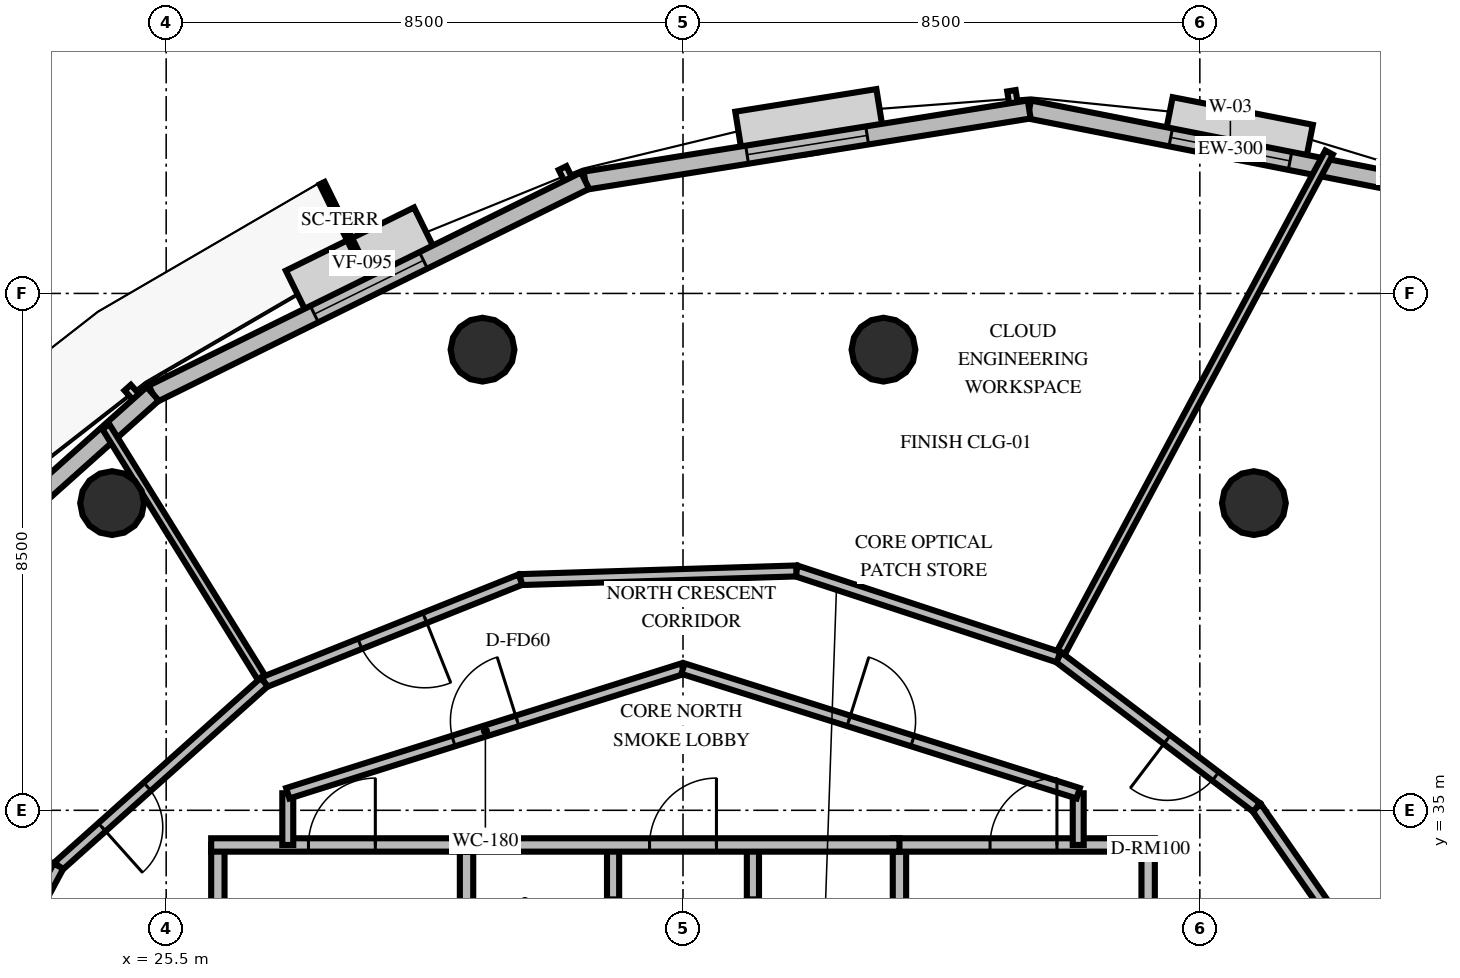
"""IFC4 building model, lengths in metres.
Left out: names, types, materials, properties, quantities, classifications, styles, units other than length and angle.
Written with IfcOpenShell. Run it as: python <this file> out.ifc"""

import sys

from ifc_helpers import new_model, si_unit, direction, frame, frame_2d, origin, origin_2d, place, context, subcontext, project, spatial, rectangle, circle, extrude, element, fill, save


model = new_model("IFC4")
c1 = context("Model", 3, precision=1e-05, world=origin(), true_north=direction((0.0, 1.0)))
c2 = subcontext(c1, "Body", "Model", "MODEL_VIEW")
j1 = project(units=[si_unit("LENGTHUNIT", "METRE"), si_unit("PLANEANGLEUNIT", "RADIAN")], contexts=[c1])
p1 = place(None, origin())
s1 = spatial("IfcSite", under=j1, at=p1, CompositionType="ELEMENT")
p2 = place(p1, origin())
s2 = spatial("IfcBuilding", under=s1, at=p2, CompositionType="ELEMENT")
p3 = place(p2, frame((0.0, 0.0, 206.0)))
s3 = spatial("IfcBuildingStorey", under=s2, at=p3, CompositionType="ELEMENT", Elevation=206.0)
for number, where, z_axis, x_axis in (
    (1, (43.389, 40.052, 0.0), (0.0, 0.0, 1.0), (1.0, 0.0, 0.0)),
    (2, (37.297, 42.575, 0.0), (0.0, 0.0, 1.0), (1.0, 0.0, 0.0)),
    (3, (30.703, 42.575, 0.0), (0.0, 0.0, 1.0), (1.0, 0.0, 0.0)),
    (4, (24.611, 40.052, 0.0), (0.0, 0.0, 1.0), (1.0, 0.0, 0.0)),
):
    element("IfcColumn", number, at=place(p3, frame(where, z_axis=z_axis, x_axis=x_axis)), inside=s3, PredefinedType="COLUMN", context=c2, shape_type="SweptSolid", body=[
        extrude(circle(Radius=0.525, at=origin_2d()), origin(), (0.0, 0.0, 1.0), 3.6),
    ])
p4 = place(p3, frame((46.312, 45.22, 0.0), z_axis=(0.0, 0.0, 1.0), x_axis=(-0.981100617883, 0.193498262496, 0.0)))
e5 = element("IfcWall", 5, at=p4, inside=s3, PredefinedType="SOLIDWALL", context=c2, shape_type="SweptSolid", body=[
    extrude(rectangle(XDim=6.745, YDim=0.3, at=frame_2d((3.373, 0.0))), origin(), (0.0, 0.0, 1.0), 2.66),
])
p5 = place(p4, frame((2.373, 0.0, 0.8)))
e6 = element("IfcOpeningElement", 6, at=p5, cuts=e5, PredefinedType="OPENING", context=c2, shape_type="SweptSolid", body=[
    extrude(rectangle(XDim=2.0, YDim=1.85, at=frame_2d((1.0, 0.925))), frame((0.0, 0.16, 0.0), z_axis=(0.0, -1.0, 0.0), x_axis=(1.0, 0.0, 0.0)), (0.0, 0.0, 1.0), 0.32),
])
p6 = place(p3, frame((39.694, 46.525, 0.0), z_axis=(0.0, 0.0, 1.0), x_axis=(-0.987398789475, -0.158251794757, 0.0)))
e7 = element("IfcWall", 7, at=p6, inside=s3, PredefinedType="SOLIDWALL", context=c2, shape_type="SweptSolid", body=[
    extrude(rectangle(XDim=7.397, YDim=0.3, at=frame_2d((3.699, 0.0))), origin(), (0.0, 0.0, 1.0), 2.66),
])
p7 = place(p6, frame((2.699, 0.0, 0.8)))
e8 = element("IfcOpeningElement", 8, at=p7, cuts=e7, PredefinedType="OPENING", context=c2, shape_type="SweptSolid", body=[
    extrude(rectangle(XDim=2.0, YDim=1.85, at=frame_2d((1.0, 0.925))), frame((0.0, 0.16, 0.0), z_axis=(0.0, -1.0, 0.0), x_axis=(1.0, 0.0, 0.0)), (0.0, 0.0, 1.0), 0.32),
])
p8 = place(p3, frame((32.39, 45.355, 0.0), z_axis=(0.0, 0.0, 1.0), x_axis=(-0.896932281423, -0.442167934773, 0.0)))
e9 = element("IfcWall", 9, at=p8, inside=s3, PredefinedType="SOLIDWALL", context=c2, shape_type="SweptSolid", body=[
    extrude(rectangle(XDim=7.927, YDim=0.3, at=frame_2d((3.964, 0.0))), origin(), (0.0, 0.0, 1.0), 2.66),
])
p9 = place(p8, frame((2.964, 0.0, 0.8)))
e10 = element("IfcOpeningElement", 10, at=p9, cuts=e9, PredefinedType="OPENING", context=c2, shape_type="SweptSolid", body=[
    extrude(rectangle(XDim=2.0, YDim=1.85, at=frame_2d((1.0, 0.925))), frame((0.0, 0.16, 0.0), z_axis=(0.0, -1.0, 0.0), x_axis=(1.0, 0.0, 0.0)), (0.0, 0.0, 1.0), 0.32),
])
p10 = place(p3, frame((25.28, 41.85, 0.0), z_axis=(0.0, 0.0, 1.0), x_axis=(-0.745478547566, -0.666529620586, 0.0)))
e11 = element("IfcWall", 11, at=p10, inside=s3, PredefinedType="SOLIDWALL", context=c2, shape_type="SweptSolid", body=[
    extrude(rectangle(XDim=8.127, YDim=0.3, at=frame_2d((4.063, 0.0))), origin(), (0.0, 0.0, 1.0), 2.66),
])
p11 = place(p10, frame((4.51, 0.0, 0.0)))
e12 = element("IfcOpeningElement", 12, at=p11, cuts=e11, PredefinedType="OPENING", context=c2, shape_type="SweptSolid", body=[
    extrude(rectangle(XDim=1.05, YDim=2.15, at=frame_2d((0.525, 1.075))), frame((0.0, 0.16, 0.0), z_axis=(0.0, -1.0, 0.0), x_axis=(1.0, 0.0, 0.0)), (0.0, 0.0, 1.0), 0.32),
])
p12 = place(p3, frame((26.35, 30.05, 0.0), z_axis=(0.0, 0.0, 1.0), x_axis=(0.0, 1.0, 0.0)))
e13 = element("IfcWall", 13, at=p12, inside=s3, PredefinedType="SOLIDWALL", context=c2, shape_type="SweptSolid", body=[
    extrude(rectangle(XDim=4.38, YDim=0.22, at=frame_2d((2.19, 0.0))), origin(), (0.0, 0.0, 1.0), 2.46),
])
p13 = place(p3, frame((30.44, 30.05, 0.0), z_axis=(0.0, 0.0, 1.0), x_axis=(0.0, 1.0, 0.0)))
e14 = element("IfcWall", 14, at=p13, inside=s3, PredefinedType="SOLIDWALL", context=c2, shape_type="SweptSolid", body=[
    extrude(rectangle(XDim=4.38, YDim=0.22, at=frame_2d((2.19, 0.0))), origin(), (0.0, 0.0, 1.0), 2.46),
])
p14 = place(p13, frame((0.8, 0.0, 0.0)))
e15 = element("IfcOpeningElement", 15, at=p14, cuts=e14, PredefinedType="OPENING", context=c2, shape_type="SweptSolid", body=[
    extrude(rectangle(XDim=1.05, YDim=2.1, at=frame_2d((0.525, 1.05))), frame((0.0, 0.12, 0.0), z_axis=(0.0, -1.0, 0.0), x_axis=(1.0, 0.0, 0.0)), (0.0, 0.0, 1.0), 0.24),
])
p15 = place(p3, frame((26.24, 34.43, 0.0), z_axis=(0.0, 0.0, 1.0), x_axis=(1.0, 0.0, 0.0)))
e16 = element("IfcWall", 16, at=p15, inside=s3, PredefinedType="SOLIDWALL", context=c2, shape_type="SweptSolid", body=[
    extrude(rectangle(XDim=4.31, YDim=0.22, at=frame_2d((2.155, 0.0))), origin(), (0.0, 0.0, 1.0), 2.46),
])
p16 = place(p15, frame((1.6, 0.0, 0.0)))
e17 = element("IfcOpeningElement", 17, at=p16, cuts=e16, PredefinedType="OPENING", context=c2, shape_type="SweptSolid", body=[
    extrude(rectangle(XDim=1.1, YDim=2.15, at=frame_2d((0.55, 1.075))), frame((0.0, 0.12, 0.0), z_axis=(0.0, -1.0, 0.0), x_axis=(1.0, 0.0, 0.0)), (0.0, 0.0, 1.0), 0.24),
])
p17 = place(p3, frame((32.85, 30.05, 0.0), z_axis=(0.0, 0.0, 1.0), x_axis=(0.0, 1.0, 0.0)))
e18 = element("IfcWall", 18, at=p17, inside=s3, PredefinedType="SOLIDWALL", context=c2, shape_type="SweptSolid", body=[
    extrude(rectangle(XDim=4.38, YDim=0.2, at=frame_2d((2.19, 0.0))), origin(), (0.0, 0.0, 1.0), 2.46),
])
p18 = place(p17, frame((2.65, 0.0, 0.0)))
e19 = element("IfcOpeningElement", 19, at=p18, cuts=e18, PredefinedType="OPENING", context=c2, shape_type="SweptSolid", body=[
    extrude(rectangle(XDim=0.86, YDim=2.05, at=frame_2d((0.43, 1.025))), frame((0.0, 0.11, 0.0), z_axis=(0.0, -1.0, 0.0), x_axis=(1.0, 0.0, 0.0)), (0.0, 0.0, 1.0), 0.22),
])
p19 = place(p3, frame((37.56, 30.05, 0.0), z_axis=(0.0, 0.0, 1.0), x_axis=(0.0, 1.0, 0.0)))
e20 = element("IfcWall", 20, at=p19, inside=s3, PredefinedType="SOLIDWALL", context=c2, shape_type="SweptSolid", body=[
    extrude(rectangle(XDim=4.38, YDim=0.22, at=frame_2d((2.19, 0.0))), origin(), (0.0, 0.0, 1.0), 2.46),
])
p20 = place(p19, frame((0.8, 0.0, 0.0)))
e21 = element("IfcOpeningElement", 21, at=p20, cuts=e20, PredefinedType="OPENING", context=c2, shape_type="SweptSolid", body=[
    extrude(rectangle(XDim=1.05, YDim=2.1, at=frame_2d((0.525, 1.05))), frame((0.0, 0.12, 0.0), z_axis=(0.0, -1.0, 0.0), x_axis=(1.0, 0.0, 0.0)), (0.0, 0.0, 1.0), 0.24),
])
p21 = place(p3, frame((41.65, 30.05, 0.0), z_axis=(0.0, 0.0, 1.0), x_axis=(0.0, 1.0, 0.0)))
e22 = element("IfcWall", 22, at=p21, inside=s3, PredefinedType="SOLIDWALL", context=c2, shape_type="SweptSolid", body=[
    extrude(rectangle(XDim=4.38, YDim=0.22, at=frame_2d((2.19, 0.0))), origin(), (0.0, 0.0, 1.0), 2.46),
])
p22 = place(p3, frame((37.45, 34.43, 0.0), z_axis=(0.0, 0.0, 1.0), x_axis=(1.0, 0.0, 0.0)))
e23 = element("IfcWall", 23, at=p22, inside=s3, PredefinedType="SOLIDWALL", context=c2, shape_type="SweptSolid", body=[
    extrude(rectangle(XDim=4.31, YDim=0.22, at=frame_2d((2.155, 0.0))), origin(), (0.0, 0.0, 1.0), 2.46),
])
p23 = place(p22, frame((1.6, 0.0, 0.0)))
e24 = element("IfcOpeningElement", 24, at=p23, cuts=e23, PredefinedType="OPENING", context=c2, shape_type="SweptSolid", body=[
    extrude(rectangle(XDim=1.1, YDim=2.15, at=frame_2d((0.55, 1.075))), frame((0.0, 0.12, 0.0), z_axis=(0.0, -1.0, 0.0), x_axis=(1.0, 0.0, 0.0)), (0.0, 0.0, 1.0), 0.24),
])
p24 = place(p3, frame((35.15, 30.05, 0.0), z_axis=(0.0, 0.0, 1.0), x_axis=(0.0, 1.0, 0.0)))
e25 = element("IfcWall", 25, at=p24, inside=s3, PredefinedType="SOLIDWALL", context=c2, shape_type="SweptSolid", body=[
    extrude(rectangle(XDim=4.38, YDim=0.2, at=frame_2d((2.19, 0.0))), origin(), (0.0, 0.0, 1.0), 2.46),
])
p25 = place(p24, frame((2.65, 0.0, 0.0)))
e26 = element("IfcOpeningElement", 26, at=p25, cuts=e25, PredefinedType="OPENING", context=c2, shape_type="SweptSolid", body=[
    extrude(rectangle(XDim=0.86, YDim=2.05, at=frame_2d((0.43, 1.025))), frame((0.0, 0.11, 0.0), z_axis=(0.0, -1.0, 0.0), x_axis=(1.0, 0.0, 0.0)), (0.0, 0.0, 1.0), 0.22),
])
p26 = place(p3, frame((30.44, 34.43, 0.0), z_axis=(0.0, 0.0, 1.0), x_axis=(1.0, 0.0, 0.0)))
e27 = element("IfcWall", 27, at=p26, inside=s3, PredefinedType="SOLIDWALL", context=c2, shape_type="SweptSolid", body=[
    extrude(rectangle(XDim=7.12, YDim=0.22, at=frame_2d((3.56, 0.0))), origin(), (0.0, 0.0, 1.0), 2.46),
])
p27 = place(p26, frame((3.01, 0.0, 0.0)))
e28 = element("IfcOpeningElement", 28, at=p27, cuts=e27, PredefinedType="OPENING", context=c2, shape_type="SweptSolid", body=[
    extrude(rectangle(XDim=1.1, YDim=2.15, at=frame_2d((0.55, 1.075))), frame((0.0, 0.12, 0.0), z_axis=(0.0, -1.0, 0.0), x_axis=(1.0, 0.0, 0.0)), (0.0, 0.0, 1.0), 0.24),
])
for number, where, z_axis, x_axis in (
    (29, (27.5, 34.43, 0.0), (0.0, 0.0, 1.0), (0.0, 1.0, 0.0)),
    (30, (40.5, 35.28, 0.0), (0.0, 0.0, 1.0), (0.0, -1.0, 0.0)),
):
    element("IfcWall", number, at=place(p3, frame(where, z_axis=z_axis, x_axis=x_axis)), inside=s3, PredefinedType="PARTITIONING", context=c2, shape_type="SweptSolid", body=[
        extrude(rectangle(XDim=0.85, YDim=0.18, at=frame_2d((0.425, 0.0))), origin(), (0.0, 0.0, 1.0), 2.46),
    ])
p28 = place(p3, frame((27.5, 35.28, 0.0), z_axis=(0.0, 0.0, 1.0), x_axis=(0.953691418528, 0.300786765376, 0.0)))
e31 = element("IfcWall", 31, at=p28, inside=s3, PredefinedType="PARTITIONING", context=c2, shape_type="SweptSolid", body=[
    extrude(rectangle(XDim=6.816, YDim=0.18, at=frame_2d((3.408, 0.0))), origin(), (0.0, 0.0, 1.0), 2.46),
])
p29 = place(p28, frame((2.858, 0.0, 0.0)))
e32 = element("IfcOpeningElement", 32, at=p29, cuts=e31, PredefinedType="OPENING", context=c2, shape_type="SweptSolid", body=[
    extrude(rectangle(XDim=1.1, YDim=2.15, at=frame_2d((0.55, 1.075))), frame((0.0, 0.1, 0.0), z_axis=(0.0, -1.0, 0.0), x_axis=(1.0, 0.0, 0.0)), (0.0, 0.0, 1.0), 0.2),
])
p30 = place(p3, frame((34.0, 37.33, 0.0), z_axis=(0.0, 0.0, 1.0), x_axis=(0.953691418528, -0.300786765376, 0.0)))
e33 = element("IfcWall", 33, at=p30, inside=s3, PredefinedType="PARTITIONING", context=c2, shape_type="SweptSolid", body=[
    extrude(rectangle(XDim=6.816, YDim=0.18, at=frame_2d((3.408, 0.0))), origin(), (0.0, 0.0, 1.0), 2.46),
])
p31 = place(p30, frame((2.858, 0.0, 0.0)))
e34 = element("IfcOpeningElement", 34, at=p31, cuts=e33, PredefinedType="OPENING", context=c2, shape_type="SweptSolid", body=[
    extrude(rectangle(XDim=1.1, YDim=2.15, at=frame_2d((0.55, 1.075))), frame((0.0, 0.1, 0.0), z_axis=(0.0, -1.0, 0.0), x_axis=(1.0, 0.0, 0.0)), (0.0, 0.0, 1.0), 0.2),
])
p32 = place(p3, frame((40.176, 37.519, 0.0), z_axis=(0.0, 0.0, 1.0), x_axis=(0.472554504692, 0.881301446779, 0.0)))
e35 = element("IfcWall", 35, at=p32, inside=s3, PredefinedType="PARTITIONING", context=c2, shape_type="SweptSolid", body=[
    extrude(rectangle(XDim=9.416, YDim=0.14, at=frame_2d((4.708, 0.0))), origin(), (0.0, 0.0, 1.0), 2.46),
])
p33 = place(p3, frame((45.767, 31.688, 0.0), z_axis=(0.0, 0.0, 1.0), x_axis=(-0.570702334989, 0.821157015947, 0.0)))
e36 = element("IfcWall", 36, at=p33, inside=s3, PredefinedType="PARTITIONING", context=c2, shape_type="SweptSolid", body=[
    extrude(rectangle(XDim=4.089, YDim=0.18, at=frame_2d((2.045, 0.0))), origin(), (0.0, 0.0, 1.0), 2.46),
])
p34 = place(p3, frame((43.433, 35.046, 0.0), z_axis=(0.0, 0.0, 1.0), x_axis=(-0.796540561183, 0.604585092762, 0.0)))
e37 = element("IfcWall", 37, at=p34, inside=s3, PredefinedType="PARTITIONING", context=c2, shape_type="SweptSolid", body=[
    extrude(rectangle(XDim=4.089, YDim=0.18, at=frame_2d((2.044, 0.0))), origin(), (0.0, 0.0, 1.0), 2.46),
])
p35 = place(p34, frame((0.847, 0.0, 0.0)))
e38 = element("IfcOpeningElement", 38, at=p35, cuts=e37, PredefinedType="OPENING", context=c2, shape_type="SweptSolid", body=[
    extrude(rectangle(XDim=1.0, YDim=2.15, at=frame_2d((0.5, 1.075))), frame((0.0, 0.1, 0.0), z_axis=(0.0, -1.0, 0.0), x_axis=(1.0, 0.0, 0.0)), (0.0, 0.0, 1.0), 0.2),
])
p36 = place(p3, frame((27.113, 37.108, 0.0), z_axis=(0.0, 0.0, 1.0), x_axis=(-0.52699889077, 0.849865971273, 0.0)))
e39 = element("IfcWall", 39, at=p36, inside=s3, PredefinedType="PARTITIONING", context=c2, shape_type="SweptSolid", body=[
    extrude(rectangle(XDim=4.943, YDim=0.14, at=frame_2d((2.472, 0.0))), origin(), (0.0, 0.0, 1.0), 2.46),
])
p37 = place(p3, frame((40.176, 37.519, 0.0), z_axis=(0.0, 0.0, 1.0), x_axis=(-0.949971574886, 0.312336368212, 0.0)))
e40 = element("IfcWall", 40, at=p37, inside=s3, PredefinedType="PARTITIONING", context=c2, shape_type="SweptSolid", body=[
    extrude(rectangle(XDim=4.539, YDim=0.18, at=frame_2d((2.27, 0.0))), origin(), (0.0, 0.0, 1.0), 2.46),
])
p38 = place(p3, frame((35.864, 38.936, 0.0), z_axis=(0.0, 0.0, 1.0), x_axis=(-0.999506603808, -0.031409376702, 0.0)))
e41 = element("IfcWall", 41, at=p38, inside=s3, PredefinedType="PARTITIONING", context=c2, shape_type="SweptSolid", body=[
    extrude(rectangle(XDim=4.539, YDim=0.18, at=frame_2d((2.27, 0.0))), origin(), (0.0, 0.0, 1.0), 2.46),
])
p39 = place(p3, frame((31.327, 38.794, 0.0), z_axis=(0.0, 0.0, 1.0), x_axis=(-0.928491528262, -0.371353580763, 0.0)))
e42 = element("IfcWall", 42, at=p39, inside=s3, PredefinedType="PARTITIONING", context=c2, shape_type="SweptSolid", body=[
    extrude(rectangle(XDim=4.539, YDim=0.18, at=frame_2d((2.27, 0.0))), origin(), (0.0, 0.0, 1.0), 2.46),
])
p40 = place(p39, frame((1.695, 0.0, 0.0)))
e43 = element("IfcOpeningElement", 43, at=p40, cuts=e42, PredefinedType="OPENING", context=c2, shape_type="SweptSolid", body=[
    extrude(rectangle(XDim=1.15, YDim=2.15, at=frame_2d((0.575, 1.075))), frame((0.0, 0.1, 0.0), z_axis=(0.0, -1.0, 0.0), x_axis=(1.0, 0.0, 0.0)), (0.0, 0.0, 1.0), 0.2),
])
p41 = place(p3, frame((27.113, 37.108, 0.0), z_axis=(0.0, 0.0, 1.0), x_axis=(-0.745456496411, -0.66655428283, 0.0)))
e44 = element("IfcWall", 44, at=p41, inside=s3, PredefinedType="PARTITIONING", context=c2, shape_type="SweptSolid", body=[
    extrude(rectangle(XDim=4.539, YDim=0.18, at=frame_2d((2.27, 0.0))), origin(), (0.0, 0.0, 1.0), 2.46),
])
p42 = place(p41, frame((2.579, 0.0, 0.0)))
e45 = element("IfcOpeningElement", 45, at=p42, cuts=e44, PredefinedType="OPENING", context=c2, shape_type="SweptSolid", body=[
    extrude(rectangle(XDim=1.0, YDim=2.15, at=frame_2d((0.5, 1.075))), frame((0.0, 0.1, 0.0), z_axis=(0.0, -1.0, 0.0), x_axis=(1.0, 0.0, 0.0)), (0.0, 0.0, 1.0), 0.2),
])
p43 = place(p3, frame((23.729, 34.083, 0.0), z_axis=(0.0, 0.0, 1.0), x_axis=(-0.472569149638, -0.881293593992, 0.0)))
e46 = element("IfcWall", 46, at=p43, inside=s3, PredefinedType="PARTITIONING", context=c2, shape_type="SweptSolid", body=[
    extrude(rectangle(XDim=4.539, YDim=0.18, at=frame_2d((2.27, 0.0))), origin(), (0.0, 0.0, 1.0), 2.46),
])
p44 = place(p5, origin())
e47 = element("IfcWindow", 47, at=p44, inside=s3, PartitioningType="SINGLE_PANEL", PredefinedType="WINDOW", context=c2, shape_type="SweptSolid", body=[
    extrude(rectangle(XDim=2.0, YDim=1.85, at=frame_2d((1.0, 0.925))), frame((0.0, 0.03, 0.0), z_axis=(0.0, -1.0, 0.0), x_axis=(1.0, 0.0, 0.0)), (0.0, 0.0, 1.0), 0.06),
])
fill(e6, e47)
p45 = place(p7, origin())
e48 = element("IfcWindow", 48, at=p45, inside=s3, PartitioningType="SINGLE_PANEL", PredefinedType="WINDOW", context=c2, shape_type="SweptSolid", body=[
    extrude(rectangle(XDim=2.0, YDim=1.85, at=frame_2d((1.0, 0.925))), frame((0.0, 0.03, 0.0), z_axis=(0.0, -1.0, 0.0), x_axis=(1.0, 0.0, 0.0)), (0.0, 0.0, 1.0), 0.06),
])
fill(e8, e48)
p46 = place(p9, origin())
e49 = element("IfcWindow", 49, at=p46, inside=s3, PartitioningType="SINGLE_PANEL", PredefinedType="WINDOW", context=c2, shape_type="SweptSolid", body=[
    extrude(rectangle(XDim=2.0, YDim=1.85, at=frame_2d((1.0, 0.925))), frame((0.0, 0.03, 0.0), z_axis=(0.0, -1.0, 0.0), x_axis=(1.0, 0.0, 0.0)), (0.0, 0.0, 1.0), 0.06),
])
fill(e10, e49)
p47 = place(p16, origin())
e50 = element("IfcDoor", 50, at=p47, inside=s3, OperationType="SINGLE_SWING_RIGHT", PredefinedType="DOOR", context=c2, shape_type="SweptSolid", body=[
    extrude(rectangle(XDim=1.1, YDim=2.15, at=frame_2d((0.55, 1.075))), frame((0.0, 0.025, 0.0), z_axis=(0.0, -1.0, 0.0), x_axis=(1.0, 0.0, 0.0)), (0.0, 0.0, 1.0), 0.05),
])
fill(e17, e50)
p48 = place(p18, origin())
e51 = element("IfcDoor", 51, at=p48, inside=s3, OperationType="SINGLE_SWING_LEFT", PredefinedType="TRAPDOOR", context=c2, shape_type="SweptSolid", body=[
    extrude(rectangle(XDim=0.86, YDim=2.05, at=frame_2d((0.43, 1.025))), frame((0.0, 0.025, 0.0), z_axis=(0.0, -1.0, 0.0), x_axis=(1.0, 0.0, 0.0)), (0.0, 0.0, 1.0), 0.05),
])
fill(e19, e51)
p49 = place(p23, origin())
e52 = element("IfcDoor", 52, at=p49, inside=s3, OperationType="SINGLE_SWING_RIGHT", PredefinedType="DOOR", context=c2, shape_type="SweptSolid", body=[
    extrude(rectangle(XDim=1.1, YDim=2.15, at=frame_2d((0.55, 1.075))), frame((0.0, 0.025, 0.0), z_axis=(0.0, -1.0, 0.0), x_axis=(1.0, 0.0, 0.0)), (0.0, 0.0, 1.0), 0.05),
])
fill(e24, e52)
p50 = place(p25, origin())
e53 = element("IfcDoor", 53, at=p50, inside=s3, OperationType="SINGLE_SWING_LEFT", PredefinedType="TRAPDOOR", context=c2, shape_type="SweptSolid", body=[
    extrude(rectangle(XDim=0.86, YDim=2.05, at=frame_2d((0.43, 1.025))), frame((0.0, 0.025, 0.0), z_axis=(0.0, -1.0, 0.0), x_axis=(1.0, 0.0, 0.0)), (0.0, 0.0, 1.0), 0.05),
])
fill(e26, e53)
p51 = place(p27, origin())
e54 = element("IfcDoor", 54, at=p51, inside=s3, OperationType="SINGLE_SWING_RIGHT", PredefinedType="DOOR", context=c2, shape_type="SweptSolid", body=[
    extrude(rectangle(XDim=1.1, YDim=2.15, at=frame_2d((0.55, 1.075))), frame((0.0, 0.025, 0.0), z_axis=(0.0, -1.0, 0.0), x_axis=(1.0, 0.0, 0.0)), (0.0, 0.0, 1.0), 0.05),
])
fill(e28, e54)
p52 = place(p29, origin())
e55 = element("IfcDoor", 55, at=p52, inside=s3, OperationType="SINGLE_SWING_RIGHT", PredefinedType="DOOR", context=c2, shape_type="SweptSolid", body=[
    extrude(rectangle(XDim=1.1, YDim=2.15, at=frame_2d((0.55, 1.075))), frame((0.0, 0.025, 0.0), z_axis=(0.0, -1.0, 0.0), x_axis=(1.0, 0.0, 0.0)), (0.0, 0.0, 1.0), 0.05),
])
fill(e32, e55)
p53 = place(p31, origin())
e56 = element("IfcDoor", 56, at=p53, inside=s3, OperationType="SINGLE_SWING_LEFT", PredefinedType="DOOR", context=c2, shape_type="SweptSolid", body=[
    extrude(rectangle(XDim=1.1, YDim=2.15, at=frame_2d((0.55, 1.075))), frame((0.0, 0.025, 0.0), z_axis=(0.0, -1.0, 0.0), x_axis=(1.0, 0.0, 0.0)), (0.0, 0.0, 1.0), 0.05),
])
fill(e34, e56)
p54 = place(p35, origin())
e57 = element("IfcDoor", 57, at=p54, inside=s3, OperationType="SINGLE_SWING_RIGHT", PredefinedType="DOOR", context=c2, shape_type="SweptSolid", body=[
    extrude(rectangle(XDim=1.0, YDim=2.15, at=frame_2d((0.5, 1.075))), frame((0.0, 0.025, 0.0), z_axis=(0.0, -1.0, 0.0), x_axis=(1.0, 0.0, 0.0)), (0.0, 0.0, 1.0), 0.05),
])
fill(e38, e57)
p55 = place(p40, origin())
e58 = element("IfcDoor", 58, at=p55, inside=s3, OperationType="SINGLE_SWING_LEFT", PredefinedType="DOOR", context=c2, shape_type="SweptSolid", body=[
    extrude(rectangle(XDim=1.15, YDim=2.15, at=frame_2d((0.575, 1.075))), frame((0.0, 0.025, 0.0), z_axis=(0.0, -1.0, 0.0), x_axis=(1.0, 0.0, 0.0)), (0.0, 0.0, 1.0), 0.05),
])
fill(e43, e58)
p56 = place(p42, origin())
e59 = element("IfcDoor", 59, at=p56, inside=s3, OperationType="SINGLE_SWING_RIGHT", PredefinedType="DOOR", context=c2, shape_type="SweptSolid", body=[
    extrude(rectangle(XDim=1.0, YDim=2.15, at=frame_2d((0.5, 1.075))), frame((0.0, 0.025, 0.0), z_axis=(0.0, -1.0, 0.0), x_axis=(1.0, 0.0, 0.0)), (0.0, 0.0, 1.0), 0.05),
])
fill(e45, e59)
save(model, sys.argv[1])
